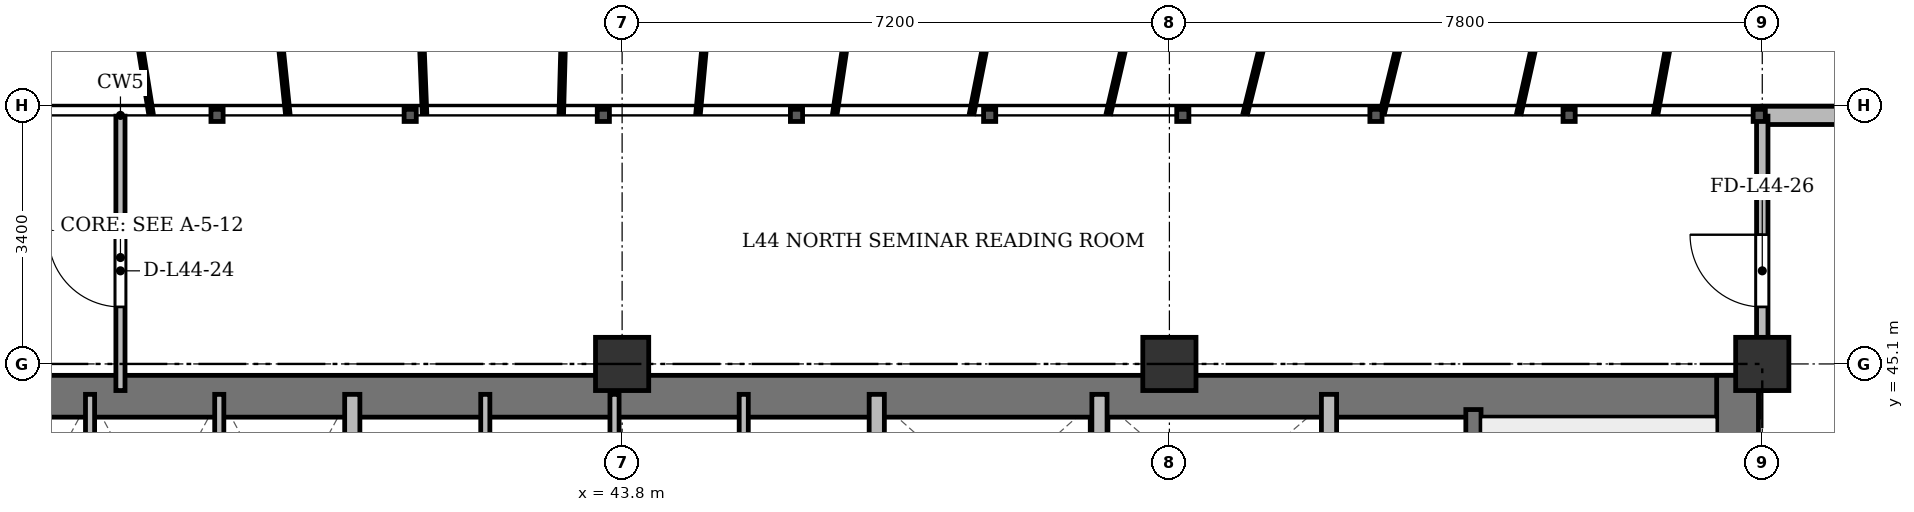
"""IFC4 building model, lengths in metres.
Left out: names, types, materials, properties, quantities, classifications, styles, units other than length and angle.
Written with IfcOpenShell. Run it as: python <this file> out.ifc"""

import sys

from ifc_helpers import new_model, si_unit, direction, frame, frame_2d, origin, origin_2d, place, context, subcontext, project, spatial, rectangle, extrude, source, transform, mapped, element, fill, save


model = new_model("IFC4")
c1 = context("Model", 3, precision=1e-05, world=origin(), true_north=direction((0.0, 1.0)))
c2 = subcontext(c1, "Body", "Model", "MODEL_VIEW")
j1 = project(units=[si_unit("LENGTHUNIT", "METRE"), si_unit("PLANEANGLEUNIT", "RADIAN")], contexts=[c1])
p1 = place(None, origin())
s1 = spatial("IfcSite", under=j1, at=p1, CompositionType="ELEMENT")
p2 = place(p1, origin())
s2 = spatial("IfcBuilding", under=s1, at=p2, CompositionType="ELEMENT")
p3 = place(p2, frame((0.0, 0.0, 168.1)))
s3 = spatial("IfcBuildingStorey", under=s2, at=p3, CompositionType="ELEMENT", Elevation=168.1)
m1 = source(origin(), c2, "Body", "SweptSolid", [
    extrude(rectangle(XDim=0.7, YDim=0.7, at=origin_2d()), origin(), (0.0, 0.0, 1.0), 3.6),
])
for number, where, z_axis, x_axis in (
    (1, (43.8, 45.1, 0.0), (0.0, 0.0, 1.0), (1.0, 0.0, 0.0)),
    (2, (51.0, 45.1, 0.0), (0.0, 0.0, 1.0), (1.0, 0.0, 0.0)),
    (3, (58.8, 45.1, 0.0), (0.0, 0.0, 1.0), (1.0, 0.0, 0.0)),
):
    element("IfcColumn", number, at=place(p3, frame(where, z_axis=z_axis, x_axis=x_axis)), inside=s3, PredefinedType="COLUMN", context=c2, shape_type="MappedRepresentation", body=[
        mapped(m1, transform((0.0, 0.0, 0.0), x_axis=(1.0, 0.0, 0.0), y_axis=(0.0, 1.0, 0.0), z_axis=(0.0, 0.0, 1.0), scale=1.0)),
    ])
p4 = place(p3, frame((58.8, 48.37, 0.0), z_axis=(0.0, 0.0, 1.0), x_axis=(1.0, 0.0, 0.0)))
e4 = element("IfcWall", 4, at=p4, inside=s3, PredefinedType="SOLIDWALL", context=c2, shape_type="SweptSolid", body=[
    extrude(rectangle(XDim=4.7, YDim=0.24, at=frame_2d((2.35, 0.0))), origin(), (0.0, 0.0, 1.0), 3.35),
])
p5 = place(p4, frame((1.659, 0.0, 0.9)))
e5 = element("IfcOpeningElement", 5, at=p5, cuts=e4, PredefinedType="OPENING", context=c2, shape_type="SweptSolid", body=[
    extrude(rectangle(XDim=1.2, YDim=1.65, at=frame_2d((0.6, 0.825))), frame((0.0, 0.13, 0.0), z_axis=(0.0, -1.0, 0.0), x_axis=(1.0, 0.0, 0.0)), (0.0, 0.0, 1.0), 0.26),
])
p6 = place(p3, frame((15.65, 44.675, 0.0), z_axis=(0.0, 0.0, 1.0), x_axis=(1.0, 0.0, 0.0)))
e6 = element("IfcWall", 6, at=p6, inside=s3, PredefinedType="SHEAR", context=c2, shape_type="SweptSolid", body=[
    extrude(rectangle(XDim=43.1, YDim=0.55, at=frame_2d((21.55, 0.0))), origin(), (0.0, 0.0, 1.0), 3.35),
])
p7 = place(p3, frame((58.475, 33.4, 0.0), z_axis=(0.0, 0.0, 1.0), x_axis=(0.0, 1.0, 0.0)))
e7 = element("IfcWall", 7, at=p7, inside=s3, PredefinedType="SHEAR", context=c2, shape_type="SweptSolid", body=[
    extrude(rectangle(XDim=11.55, YDim=0.55, at=frame_2d((5.775, 0.0))), origin(), (0.0, 0.0, 1.0), 3.35),
])
p8 = place(p3, frame((55.0, 33.4, 0.0), z_axis=(0.0, 0.0, 1.0), x_axis=(0.0, 1.0, 0.0)))
e8 = element("IfcWall", 8, at=p8, inside=s3, PredefinedType="SHEAR", context=c2, shape_type="SweptSolid", body=[
    extrude(rectangle(XDim=11.1, YDim=0.2, at=frame_2d((5.55, 0.0))), origin(), (0.0, 0.0, 1.0), 3.35),
])
p9 = place(p8, frame((0.85, 0.0, 0.0)))
e9 = element("IfcOpeningElement", 9, at=p9, cuts=e8, PredefinedType="OPENING", context=c2, shape_type="SweptSolid", body=[
    extrude(rectangle(XDim=1.1, YDim=2.15, at=frame_2d((0.55, 1.075))), frame((0.0, 0.11, 0.0), z_axis=(0.0, -1.0, 0.0), x_axis=(1.0, 0.0, 0.0)), (0.0, 0.0, 1.0), 0.22),
])
for number, where, z_axis, x_axis in (
    (10, (36.8, 41.5, 0.0), (0.0, 0.0, 1.0), (0.0, 1.0, 0.0)),
    (11, (38.5, 41.5, 0.0), (0.0, 0.0, 1.0), (0.0, 1.0, 0.0)),
):
    element("IfcWall", number, at=place(p3, frame(where, z_axis=z_axis, x_axis=x_axis)), inside=s3, PredefinedType="PARTITIONING", context=c2, shape_type="SweptSolid", body=[
        extrude(rectangle(XDim=3.2, YDim=0.12, at=frame_2d((1.6, 0.0))), origin(), (0.0, 0.0, 1.0), 3.35),
    ])
p10 = place(p3, frame((40.25, 41.5, 0.0), z_axis=(0.0, 0.0, 1.0), x_axis=(0.0, 1.0, 0.0)))
e12 = element("IfcWall", 12, at=p10, inside=s3, PredefinedType="SOLIDWALL", context=c2, shape_type="SweptSolid", body=[
    extrude(rectangle(XDim=3.2, YDim=0.2, at=frame_2d((1.6, 0.0))), origin(), (0.0, 0.0, 1.0), 3.35),
])
p11 = place(p3, frame((42.0, 41.5, 0.0), z_axis=(0.0, 0.0, 1.0), x_axis=(0.0, 1.0, 0.0)))
e13 = element("IfcWall", 13, at=p11, inside=s3, PredefinedType="PARTITIONING", context=c2, shape_type="SweptSolid", body=[
    extrude(rectangle(XDim=3.2, YDim=0.12, at=frame_2d((1.6, 0.0))), origin(), (0.0, 0.0, 1.0), 3.35),
])
p12 = place(p3, frame((43.7, 41.5, 0.0), z_axis=(0.0, 0.0, 1.0), x_axis=(0.0, 1.0, 0.0)))
e14 = element("IfcWall", 14, at=p12, inside=s3, PredefinedType="PARTITIONING", context=c2, shape_type="SweptSolid", body=[
    extrude(rectangle(XDim=3.2, YDim=0.12, at=frame_2d((1.6, 0.0))), origin(), (0.0, 0.0, 1.0), 2.85),
])
p13 = place(p3, frame((45.4, 41.5, 0.0), z_axis=(0.0, 0.0, 1.0), x_axis=(0.0, 1.0, 0.0)))
e15 = element("IfcWall", 15, at=p13, inside=s3, PredefinedType="PARTITIONING", context=c2, shape_type="SweptSolid", body=[
    extrude(rectangle(XDim=3.2, YDim=0.12, at=frame_2d((1.6, 0.0))), origin(), (0.0, 0.0, 1.0), 3.35),
])
p14 = place(p3, frame((47.15, 33.4, 0.0), z_axis=(0.0, 0.0, 1.0), x_axis=(0.0, 1.0, 0.0)))
e16 = element("IfcWall", 16, at=p14, inside=s3, PredefinedType="SOLIDWALL", context=c2, shape_type="SweptSolid", body=[
    extrude(rectangle(XDim=11.3, YDim=0.2, at=frame_2d((5.65, 0.0))), origin(), (0.0, 0.0, 1.0), 2.75),
])
for number, where, z_axis, x_axis in (
    (17, (50.08, 42.05, 0.0), (0.0, 0.0, 1.0), (0.0, 1.0, 0.0)),
    (18, (53.1, 42.05, 0.0), (0.0, 0.0, 1.0), (0.0, 1.0, 0.0)),
):
    element("IfcWall", number, at=place(p3, frame(where, z_axis=z_axis, x_axis=x_axis)), inside=s3, PredefinedType="SOLIDWALL", context=c2, shape_type="SweptSolid", body=[
        extrude(rectangle(XDim=2.65, YDim=0.2, at=frame_2d((1.325, 0.0))), origin(), (0.0, 0.0, 1.0), 3.35),
    ])
p15 = place(p3, frame((37.2, 44.75, 0.0), z_axis=(0.0, 0.0, 1.0), x_axis=(0.0, 1.0, 0.0)))
e19 = element("IfcWall", 19, at=p15, inside=s3, PredefinedType="PARTITIONING", context=c2, shape_type="SweptSolid", body=[
    extrude(rectangle(XDim=3.61, YDim=0.12, at=frame_2d((1.805, 0.0))), origin(), (0.0, 0.0, 1.0), 2.75),
])
p16 = place(p15, frame((1.1, 0.0, 0.0)))
e20 = element("IfcOpeningElement", 20, at=p16, cuts=e19, PredefinedType="OPENING", context=c2, shape_type="SweptSolid", body=[
    extrude(rectangle(XDim=0.95, YDim=2.15, at=frame_2d((0.475, 1.075))), frame((0.0, 0.07, 0.0), z_axis=(0.0, -1.0, 0.0), x_axis=(1.0, 0.0, 0.0)), (0.0, 0.0, 1.0), 0.14),
])
p17 = place(p3, frame((58.8, 44.75, 0.0), z_axis=(0.0, 0.0, 1.0), x_axis=(0.0, 1.0, 0.0)))
e21 = element("IfcWall", 21, at=p17, inside=s3, PredefinedType="PARTITIONING", context=c2, shape_type="SweptSolid", body=[
    extrude(rectangle(XDim=3.61, YDim=0.15, at=frame_2d((1.805, 0.0))), origin(), (0.0, 0.0, 1.0), 2.85),
])
p18 = place(p17, frame((1.1, 0.0, 0.0)))
e22 = element("IfcOpeningElement", 22, at=p18, cuts=e21, PredefinedType="OPENING", context=c2, shape_type="SweptSolid", body=[
    extrude(rectangle(XDim=0.95, YDim=2.15, at=frame_2d((0.475, 1.075))), frame((0.0, 0.085, 0.0), z_axis=(0.0, -1.0, 0.0), x_axis=(1.0, 0.0, 0.0)), (0.0, 0.0, 1.0), 0.17),
])
m2 = source(origin(), c2, "Body", "SweptSolid", [
    extrude(rectangle(XDim=0.95, YDim=2.15, at=frame_2d((0.475, 1.075))), frame((0.0, 0.025, 0.0), z_axis=(0.0, -1.0, 0.0), x_axis=(1.0, 0.0, 0.0)), (0.0, 0.0, 1.0), 0.05),
])
p19 = place(p16, origin())
e23 = element("IfcDoor", 23, at=p19, inside=s3, OperationType="SINGLE_SWING_RIGHT", PredefinedType="DOOR", context=c2, shape_type="MappedRepresentation", body=[
    mapped(m2, transform((0.0, 0.0, 0.0), x_axis=(1.0, 0.0, 0.0), y_axis=(0.0, 1.0, 0.0), z_axis=(0.0, 0.0, 1.0), scale=1.0)),
])
fill(e20, e23)
p20 = place(p18, origin())
e24 = element("IfcDoor", 24, at=p20, inside=s3, OperationType="SINGLE_SWING_RIGHT", PredefinedType="DOOR", context=c2, shape_type="MappedRepresentation", body=[
    mapped(m2, transform((0.0, 0.0, 0.0), x_axis=(1.0, 0.0, 0.0), y_axis=(0.0, 1.0, 0.0), z_axis=(0.0, 0.0, 1.0), scale=1.0)),
])
fill(e22, e24)
save(model, sys.argv[1])
